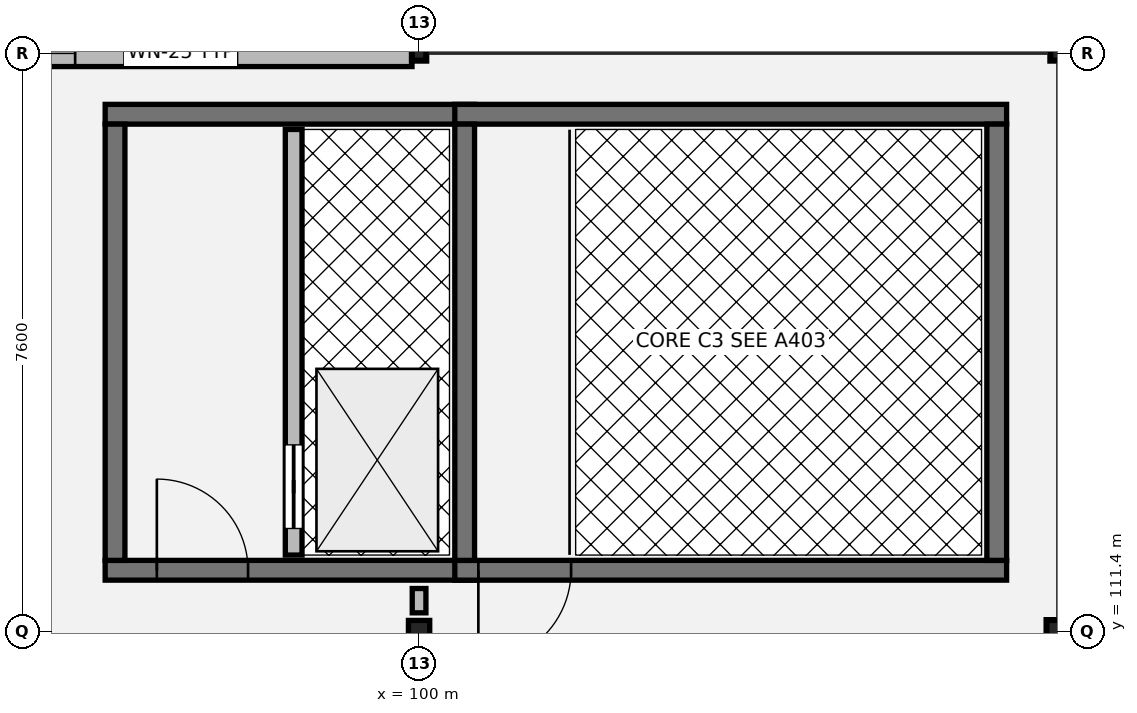
"""IFC4 building model, lengths in metres.
Left out: names, types, materials, properties, quantities, classifications, styles, units other than length and angle.
Written with IfcOpenShell. Run it as: python <this file> out.ifc"""

import sys

from ifc_helpers import new_model, si_unit, direction, frame, frame_2d, origin, origin_2d, place, context, subcontext, project, spatial, rectangle, hollow_rectangle, i_section, extrude, element, fill, save


model = new_model("IFC4")
c1 = context("Model", 3, precision=1e-05, world=origin(), true_north=direction((0.0, 1.0)))
c2 = subcontext(c1, "Body", "Model", "MODEL_VIEW")
j1 = project(units=[si_unit("LENGTHUNIT", "METRE"), si_unit("PLANEANGLEUNIT", "RADIAN")], contexts=[c1])
p1 = place(None, origin())
s1 = spatial("IfcSite", under=j1, at=p1, CompositionType="ELEMENT")
p2 = place(p1, origin())
s2 = spatial("IfcBuilding", under=s1, at=p2, CompositionType="ELEMENT")
p3 = place(p2, frame((0.0, 0.0, 21.42)))
s3 = spatial("IfcBuildingStorey", under=s2, at=p3, CompositionType="ELEMENT", Elevation=21.42)
p4 = place(p3, frame((100.0, 111.4, 0.0), z_axis=(0.0, 0.0, 1.0), x_axis=(1.0, 0.0, 0.0)))
e1 = element("IfcColumn", 1, at=p4, inside=s3, PredefinedType="COLUMN", context=c2, shape_type="SweptSolid", body=[
    extrude(i_section(OverallWidth=0.28, OverallDepth=0.28, WebThickness=0.01, FlangeThickness=0.018, at=origin_2d()), origin(), (0.0, 0.0, 1.0), 3.88),
])
p5 = place(p3, frame((100.0, 119.0, 0.0), z_axis=(0.0, 0.0, 1.0), x_axis=(1.0, 0.0, 0.0)))
e2 = element("IfcColumn", 2, at=p5, inside=s3, PredefinedType="COLUMN", context=c2, shape_type="SweptSolid", body=[
    extrude(hollow_rectangle(XDim=0.18, YDim=0.18, WallThickness=0.01, at=origin_2d()), origin(), (0.0, 0.0, 1.0), 3.88),
])
p6 = place(p3, frame((108.4, 111.4, 0.0), z_axis=(0.0, 0.0, 1.0), x_axis=(1.0, 0.0, 0.0)))
e3 = element("IfcColumn", 3, at=p6, inside=s3, PredefinedType="COLUMN", context=c2, shape_type="SweptSolid", body=[
    extrude(i_section(OverallWidth=0.28, OverallDepth=0.28, WebThickness=0.01, FlangeThickness=0.018, at=origin_2d()), origin(), (0.0, 0.0, 1.0), 3.88),
])
p7 = place(p3, frame((108.4, 119.0, 0.0), z_axis=(0.0, 0.0, 1.0), x_axis=(1.0, 0.0, 0.0)))
e4 = element("IfcColumn", 4, at=p7, inside=s3, PredefinedType="COLUMN", context=c2, shape_type="SweptSolid", body=[
    extrude(hollow_rectangle(XDim=0.18, YDim=0.18, WallThickness=0.01, at=origin_2d()), origin(), (0.0, 0.0, 1.0), 3.88),
])
p8 = place(p3, frame((99.907, 119.0, 0.0), z_axis=(0.0, 0.0, 1.0), x_axis=(-1.0, 0.0, 0.0)))
e5 = element("IfcWall", 5, at=p8, inside=s3, PredefinedType="SOLIDWALL", context=c2, shape_type="SweptSolid", body=[
    extrude(rectangle(XDim=8.214, YDim=0.345, at=frame_2d((4.107, 0.0))), origin(), (0.0, 0.0, 1.0), 3.48),
])
p9 = place(p8, frame((2.302, 0.0, 0.8)))
e6 = element("IfcOpeningElement", 6, at=p9, cuts=e5, PredefinedType="OPENING", context=c2, shape_type="SweptSolid", body=[
    extrude(rectangle(XDim=1.48, YDim=2.16, at=frame_2d((0.74, 1.08))), frame((0.0, 0.182, 0.0), z_axis=(0.0, -1.0, 0.0), x_axis=(1.0, 0.0, 0.0)), (0.0, 0.0, 1.0), 0.365),
])
p10 = place(p8, frame((4.432, 0.0, 0.8)))
e7 = element("IfcOpeningElement", 7, at=p10, cuts=e5, PredefinedType="OPENING", context=c2, shape_type="SweptSolid", body=[
    extrude(rectangle(XDim=1.48, YDim=2.16, at=frame_2d((0.74, 1.08))), frame((0.0, 0.182, 0.0), z_axis=(0.0, -1.0, 0.0), x_axis=(1.0, 0.0, 0.0)), (0.0, 0.0, 1.0), 0.365),
])
p11 = place(p3, frame((95.87, 112.2, 0.0), z_axis=(0.0, 0.0, 1.0), x_axis=(1.0, 0.0, 0.0)))
e8 = element("IfcWall", 8, at=p11, inside=s3, PredefinedType="SHEAR", context=c2, shape_type="SweptSolid", body=[
    extrude(rectangle(XDim=4.86, YDim=0.26, at=frame_2d((2.43, 0.0))), origin(), (0.0, 0.0, 1.0), 3.845),
])
p12 = place(p11, frame((0.68, 0.0, 0.0)))
e9 = element("IfcOpeningElement", 9, at=p12, cuts=e8, PredefinedType="OPENING", context=c2, shape_type="SweptSolid", body=[
    extrude(rectangle(XDim=1.2, YDim=2.16, at=frame_2d((0.6, 1.08))), frame((0.0, 0.14, 0.0), z_axis=(0.0, -1.0, 0.0), x_axis=(1.0, 0.0, 0.0)), (0.0, 0.0, 1.0), 0.28),
])
p13 = place(p3, frame((100.73, 118.2, 0.0), z_axis=(0.0, 0.0, 1.0), x_axis=(-1.0, 0.0, 0.0)))
e10 = element("IfcWall", 10, at=p13, inside=s3, PredefinedType="SHEAR", context=c2, shape_type="SweptSolid", body=[
    extrude(rectangle(XDim=4.86, YDim=0.26, at=frame_2d((2.43, 0.0))), origin(), (0.0, 0.0, 1.0), 3.845),
])
p14 = place(p3, frame((96.0, 118.07, 0.0), z_axis=(0.0, 0.0, 1.0), x_axis=(0.0, -1.0, 0.0)))
e11 = element("IfcWall", 11, at=p14, inside=s3, PredefinedType="SHEAR", context=c2, shape_type="SweptSolid", body=[
    extrude(rectangle(XDim=5.74, YDim=0.26, at=frame_2d((2.87, 0.0))), origin(), (0.0, 0.0, 1.0), 3.845),
])
p15 = place(p3, frame((98.35, 112.4, 0.0), z_axis=(0.0, 0.0, 1.0), x_axis=(0.0, 1.0, 0.0)))
e12 = element("IfcWall", 12, at=p15, inside=s3, PredefinedType="SOLIDWALL", context=c2, shape_type="SweptSolid", body=[
    extrude(rectangle(XDim=5.6, YDim=0.22, at=frame_2d((2.8, 0.0))), origin(), (0.0, 0.0, 1.0), 3.845),
])
p16 = place(p15, frame((0.35, 0.0, 0.0)))
e13 = element("IfcOpeningElement", 13, at=p16, cuts=e12, PredefinedType="OPENING", context=c2, shape_type="SweptSolid", body=[
    extrude(rectangle(XDim=1.1, YDim=2.15, at=frame_2d((0.55, 1.075))), frame((0.0, 0.12, 0.0), z_axis=(0.0, -1.0, 0.0), x_axis=(1.0, 0.0, 0.0)), (0.0, 0.0, 1.0), 0.24),
])
p17 = place(p3, frame((100.47, 112.2, 0.0), z_axis=(0.0, 0.0, 1.0), x_axis=(1.0, 0.0, 0.0)))
e14 = element("IfcWall", 14, at=p17, inside=s3, PredefinedType="SHEAR", context=c2, shape_type="SweptSolid", body=[
    extrude(rectangle(XDim=7.26, YDim=0.26, at=frame_2d((3.63, 0.0))), origin(), (0.0, 0.0, 1.0), 3.845),
])
p18 = place(p17, frame((0.31, 0.0, 0.0)))
e15 = element("IfcOpeningElement", 15, at=p18, cuts=e14, PredefinedType="OPENING", context=c2, shape_type="SweptSolid", body=[
    extrude(rectangle(XDim=1.22, YDim=2.18, at=frame_2d((0.61, 1.09))), frame((0.0, 0.14, 0.0), z_axis=(0.0, -1.0, 0.0), x_axis=(1.0, 0.0, 0.0)), (0.0, 0.0, 1.0), 0.28),
])
p19 = place(p3, frame((100.47, 118.2, 0.0), z_axis=(0.0, 0.0, 1.0), x_axis=(1.0, 0.0, 0.0)))
e16 = element("IfcWall", 16, at=p19, inside=s3, PredefinedType="SHEAR", context=c2, shape_type="SweptSolid", body=[
    extrude(rectangle(XDim=7.26, YDim=0.26, at=frame_2d((3.63, 0.0))), origin(), (0.0, 0.0, 1.0), 3.845),
])
for number, where, z_axis, x_axis in (
    (17, (100.6, 112.33, 0.0), (0.0, 0.0, 1.0), (0.0, 1.0, 0.0)),
    (18, (107.6, 112.33, 0.0), (0.0, 0.0, 1.0), (0.0, 1.0, 0.0)),
):
    element("IfcWall", number, at=place(p3, frame(where, z_axis=z_axis, x_axis=x_axis)), inside=s3, PredefinedType="SHEAR", context=c2, shape_type="SweptSolid", body=[
        extrude(rectangle(XDim=5.74, YDim=0.26, at=frame_2d((2.87, 0.0))), origin(), (0.0, 0.0, 1.0), 3.845),
    ])
p20 = place(p3, frame((100.0, 111.64, 0.0), z_axis=(0.0, 0.0, 1.0), x_axis=(0.0, 1.0, 0.0)))
e19 = element("IfcWall", 19, at=p20, inside=s3, PredefinedType="PARTITIONING", context=c2, shape_type="SweptSolid", body=[
    extrude(rectangle(XDim=0.32, YDim=0.18, at=frame_2d((0.16, 0.0))), origin(), (0.0, 0.0, 1.0), 3.18),
])
p21 = place(p9, origin())
e20 = element("IfcWindow", 20, at=p21, inside=s3, PartitioningType="SINGLE_PANEL", PredefinedType="WINDOW", context=c2, shape_type="SweptSolid", body=[
    extrude(rectangle(XDim=1.48, YDim=2.16, at=frame_2d((0.74, 1.08))), frame((0.0, 0.03, 0.0), z_axis=(0.0, -1.0, 0.0), x_axis=(1.0, 0.0, 0.0)), (0.0, 0.0, 1.0), 0.06),
])
fill(e6, e20)
p22 = place(p10, origin())
e21 = element("IfcWindow", 21, at=p22, inside=s3, PartitioningType="SINGLE_PANEL", PredefinedType="WINDOW", context=c2, shape_type="SweptSolid", body=[
    extrude(rectangle(XDim=1.48, YDim=2.16, at=frame_2d((0.74, 1.08))), frame((0.0, 0.03, 0.0), z_axis=(0.0, -1.0, 0.0), x_axis=(1.0, 0.0, 0.0)), (0.0, 0.0, 1.0), 0.06),
])
fill(e7, e21)
p23 = place(p12, origin())
e22 = element("IfcDoor", 22, at=p23, inside=s3, OperationType="SINGLE_SWING_LEFT", PredefinedType="DOOR", context=c2, shape_type="SweptSolid", body=[
    extrude(rectangle(XDim=1.2, YDim=2.16, at=frame_2d((0.6, 1.08))), frame((0.0, 0.025, 0.0), z_axis=(0.0, -1.0, 0.0), x_axis=(1.0, 0.0, 0.0)), (0.0, 0.0, 1.0), 0.05),
])
fill(e9, e22)
p24 = place(p16, origin())
e23 = element("IfcDoor", 23, at=p24, inside=s3, OperationType="SLIDING_TO_LEFT", PredefinedType="DOOR", context=c2, shape_type="SweptSolid", body=[
    extrude(rectangle(XDim=1.1, YDim=2.15, at=frame_2d((0.55, 1.075))), frame((0.0, 0.025, 0.0), z_axis=(0.0, -1.0, 0.0), x_axis=(1.0, 0.0, 0.0)), (0.0, 0.0, 1.0), 0.05),
])
fill(e13, e23)
p25 = place(p18, origin())
e24 = element("IfcDoor", 24, at=p25, inside=s3, OperationType="SINGLE_SWING_RIGHT", PredefinedType="DOOR", context=c2, shape_type="SweptSolid", body=[
    extrude(rectangle(XDim=1.22, YDim=2.18, at=frame_2d((0.61, 1.09))), frame((0.0, 0.025, 0.0), z_axis=(0.0, -1.0, 0.0), x_axis=(1.0, 0.0, 0.0)), (0.0, 0.0, 1.0), 0.05),
])
fill(e15, e24)
save(model, sys.argv[1])
